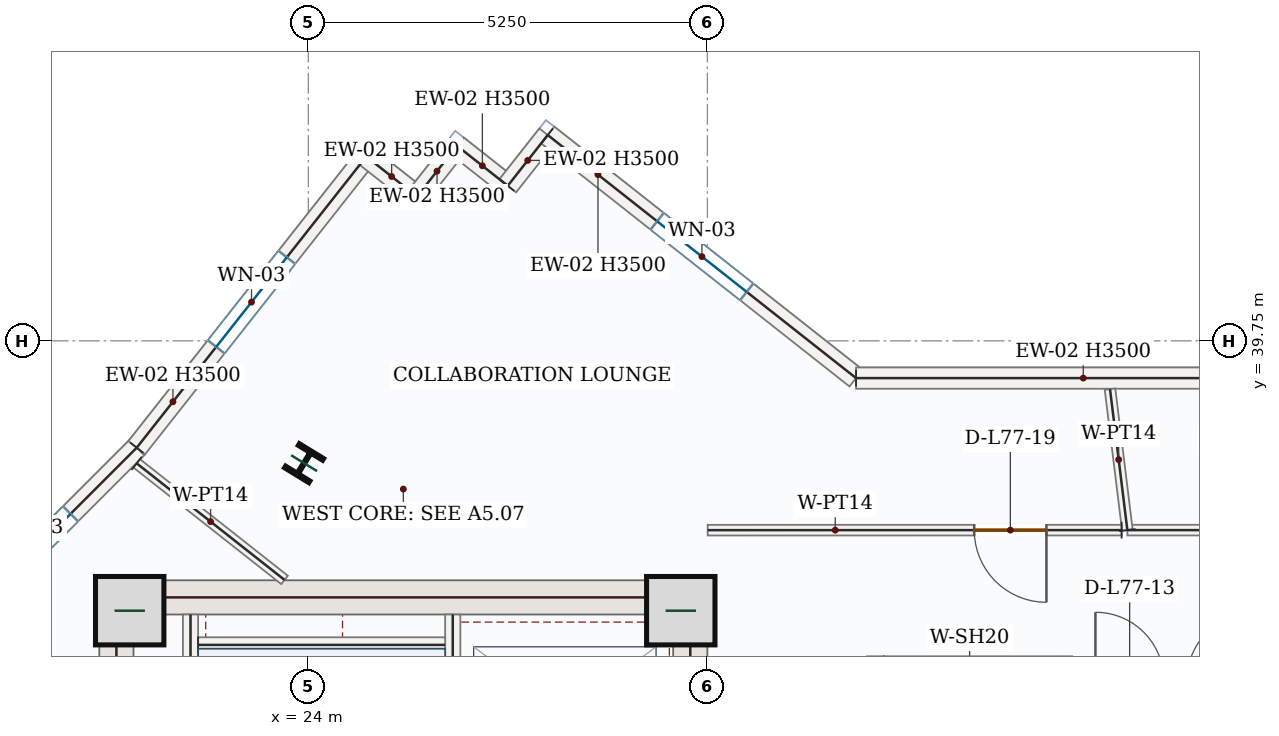
"""IFC4 building model, lengths in metres.
Left out: names, types, materials, properties, quantities, classifications, styles, units other than length and angle.
Written with IfcOpenShell. Run it as: python <this file> out.ifc"""

import sys

from ifc_helpers import new_model, si_unit, direction, frame, frame_2d, origin, origin_2d, place, context, subcontext, project, spatial, rectangle, i_section, extrude, source, transform, mapped, element, fill, save


model = new_model("IFC4")
c1 = context("Model", 3, precision=1e-05, world=origin(), true_north=direction((0.0, 1.0)))
c2 = subcontext(c1, "Body", "Model", "MODEL_VIEW")
j1 = project(units=[si_unit("LENGTHUNIT", "METRE"), si_unit("PLANEANGLEUNIT", "RADIAN")], contexts=[c1])
p1 = place(None, origin())
s1 = spatial("IfcSite", under=j1, at=p1, CompositionType="ELEMENT")
p2 = place(p1, origin())
s2 = spatial("IfcBuilding", under=s1, at=p2, CompositionType="ELEMENT")
p3 = place(p2, frame((0.0, 0.0, 319.8)))
s3 = spatial("IfcBuildingStorey", under=s2, at=p3, CompositionType="ELEMENT", Elevation=319.8)
m1 = source(origin(), c2, "Body", "SweptSolid", [
    extrude(rectangle(XDim=8.55, YDim=0.45, at=frame_2d((4.275, 0.0))), origin(), (0.0, 0.0, 1.0), 3.5),
])
p4 = place(p3, frame((21.475, 28.05, 0.0), z_axis=(0.0, 0.0, 1.0), x_axis=(0.0, 1.0, 0.0)))
e1 = element("IfcWall", 1, at=p4, inside=s3, PredefinedType="SHEAR", context=c2, shape_type="MappedRepresentation", body=[
    mapped(m1, transform((0.0, 0.0, 0.0), x_axis=(1.0, 0.0, 0.0), y_axis=(0.0, 1.0, 0.0), z_axis=(0.0, 0.0, 1.0), scale=1.0)),
])
p5 = place(p3, frame((29.025, 28.05, 0.0), z_axis=(0.0, 0.0, 1.0), x_axis=(0.0, 1.0, 0.0)))
e2 = element("IfcWall", 2, at=p5, inside=s3, PredefinedType="SHEAR", context=c2, shape_type="SweptSolid", body=[
    extrude(rectangle(XDim=8.55, YDim=0.45, at=frame_2d((4.275, 0.0))), origin(), (0.0, 0.0, 1.0), 3.5),
])
p6 = place(p5, frame((1.5, 0.0, 0.0)))
e3 = element("IfcOpeningElement", 3, at=p6, cuts=e2, PredefinedType="OPENING", context=c2, shape_type="SweptSolid", body=[
    extrude(rectangle(XDim=1.1, YDim=2.2, at=frame_2d((0.55, 1.1))), frame((0.0, 0.235, 0.0), z_axis=(0.0, -1.0, 0.0), x_axis=(1.0, 0.0, 0.0)), (0.0, 0.0, 1.0), 0.47),
])
m2 = source(origin(), c2, "Body", "SweptSolid", [
    extrude(rectangle(XDim=7.1, YDim=0.45, at=frame_2d((3.55, 0.0))), origin(), (0.0, 0.0, 1.0), 3.5),
])
p7 = place(p3, frame((21.7, 36.375, 0.0), z_axis=(0.0, 0.0, 1.0), x_axis=(1.0, 0.0, 0.0)))
e4 = element("IfcWall", 4, at=p7, inside=s3, PredefinedType="SHEAR", context=c2, shape_type="MappedRepresentation", body=[
    mapped(m2, transform((0.0, 0.0, 0.0), x_axis=(1.0, 0.0, 0.0), y_axis=(0.0, 1.0, 0.0), z_axis=(0.0, 0.0, 1.0), scale=1.0)),
])
m3 = source(origin(), c2, "Body", "SweptSolid", [
    extrude(rectangle(XDim=0.9, YDim=0.9, at=origin_2d()), origin(), (0.0, 0.0, 1.0), 3.75),
])
for number, where, z_axis, x_axis in (
    (5, (21.65, 36.2, 0.0), (0.0, 0.0, 1.0), (1.0, 0.0, 0.0)),
    (6, (28.9, 36.2, 0.0), (0.0, 0.0, 1.0), (1.0, 0.0, 0.0)),
):
    element("IfcColumn", number, at=place(p3, frame(where, z_axis=z_axis, x_axis=x_axis)), inside=s3, PredefinedType="COLUMN", context=c2, shape_type="MappedRepresentation", body=[
        mapped(m3, transform((0.0, 0.0, 0.0), x_axis=(1.0, 0.0, 0.0), y_axis=(0.0, 1.0, 0.0), z_axis=(0.0, 0.0, 1.0), scale=1.0)),
    ])
m4 = source(origin(), c2, "Body", "SweptSolid", [
    extrude(i_section(OverallWidth=0.374, OverallDepth=0.372, WebThickness=0.016, FlangeThickness=0.026, FilletRadius=0.018, at=origin_2d()), origin(), (0.0, 0.0, 1.0), 3.75),
])
p8 = place(p3, frame((23.945, 38.141, 0.0), z_axis=(0.0, 0.0, 1.0), x_axis=(-0.852640164354, 0.522498564716, 0.0)))
e7 = element("IfcColumn", 7, at=p8, inside=s3, PredefinedType="COLUMN", context=c2, shape_type="MappedRepresentation", body=[
    mapped(m4, transform((0.0, 0.0, 0.0), x_axis=(1.0, 0.0, 0.0), y_axis=(0.0, 1.0, 0.0), z_axis=(0.0, 0.0, 1.0), scale=1.0)),
])
p9 = place(p3, frame((18.94, 35.542, 0.0), z_axis=(0.0, 0.0, 1.0), x_axis=(0.707106781187, 0.707106781187, 0.0)))
e8 = element("IfcWall", 8, at=p9, inside=s3, PredefinedType="SOLIDWALL", context=c2, shape_type="SweptSolid", body=[
    extrude(rectangle(XDim=3.963, YDim=0.28, at=frame_2d((1.982, 0.0))), origin(), (0.0, 0.0, 1.0), 3.5),
])
p10 = place(p9, frame((1.232, 0.0, 0.85)))
e9 = element("IfcOpeningElement", 9, at=p10, cuts=e8, PredefinedType="OPENING", context=c2, shape_type="SweptSolid", body=[
    extrude(rectangle(XDim=1.5, YDim=1.5, at=frame_2d((0.75, 0.75))), frame((0.0, 0.15, 0.0), z_axis=(0.0, -1.0, 0.0), x_axis=(1.0, 0.0, 0.0)), (0.0, 0.0, 1.0), 0.3),
])
p11 = place(p3, frame((21.742, 38.344, 0.0), z_axis=(0.0, 0.0, 1.0), x_axis=(0.619093990715, 0.785316898239, 0.0)))
e10 = element("IfcWall", 10, at=p11, inside=s3, PredefinedType="SOLIDWALL", context=c2, shape_type="SweptSolid", body=[
    extrude(rectangle(XDim=4.878, YDim=0.28, at=frame_2d((2.439, 0.0))), origin(), (0.0, 0.0, 1.0), 3.5),
])
p12 = place(p11, frame((1.689, 0.0, 0.85)))
e11 = element("IfcOpeningElement", 11, at=p12, cuts=e10, PredefinedType="OPENING", context=c2, shape_type="SweptSolid", body=[
    extrude(rectangle(XDim=1.5, YDim=1.5, at=frame_2d((0.75, 0.75))), frame((0.0, 0.15, 0.0), z_axis=(0.0, -1.0, 0.0), x_axis=(1.0, 0.0, 0.0)), (0.0, 0.0, 1.0), 0.3),
])
m5 = source(origin(), c2, "Body", "SweptSolid", [
    extrude(rectangle(XDim=0.85, YDim=0.28, at=frame_2d((0.425, 0.0))), origin(), (0.0, 0.0, 1.0), 3.5),
])
p13 = place(p3, frame((24.762, 42.175, 0.0), z_axis=(0.0, 0.0, 1.0), x_axis=(0.785360476625, -0.619038707801, 0.0)))
e12 = element("IfcWall", 12, at=p13, inside=s3, PredefinedType="SOLIDWALL", context=c2, shape_type="MappedRepresentation", body=[
    mapped(m5, transform((0.0, 0.0, 0.0), x_axis=(1.0, 0.0, 0.0), y_axis=(0.0, 1.0, 0.0), z_axis=(0.0, 0.0, 1.0), scale=1.0)),
])
m6 = source(origin(), c2, "Body", "SweptSolid", [
    extrude(rectangle(XDim=0.85, YDim=0.28, at=frame_2d((0.425, 0.0))), origin(), (0.0, 0.0, 1.0), 3.5),
])
for number, where, z_axis, x_axis in (
    (13, (25.43, 41.649, 0.0), (0.0, 0.0, 1.0), (0.619, 0.785, 0.0)),
    (14, (25.956, 42.316, 0.0), (0.0, 0.0, 1.0), (0.785, -0.619, 0.0)),
):
    element("IfcWall", number, at=place(p3, frame(where, z_axis=z_axis, x_axis=x_axis)), inside=s3, PredefinedType="SOLIDWALL", context=c2, shape_type="MappedRepresentation", body=[
        mapped(m6, transform((0.0, 0.0, 0.0), x_axis=(1.0, 0.0, 0.0), y_axis=(0.0, 1.0, 0.0), z_axis=(0.0, 0.0, 1.0), scale=1.0)),
    ])
m7 = source(origin(), c2, "Body", "SweptSolid", [
    extrude(rectangle(XDim=0.85, YDim=0.28, at=frame_2d((0.425, 0.0))), origin(), (0.0, 0.0, 1.0), 3.5),
])
p14 = place(p3, frame((26.624, 41.79, 0.0), z_axis=(0.0, 0.0, 1.0), x_axis=(0.619076214196, 0.785330911793, 0.0)))
e15 = element("IfcWall", 15, at=p14, inside=s3, PredefinedType="SOLIDWALL", context=c2, shape_type="MappedRepresentation", body=[
    mapped(m7, transform((0.0, 0.0, 0.0), x_axis=(1.0, 0.0, 0.0), y_axis=(0.0, 1.0, 0.0), z_axis=(0.0, 0.0, 1.0), scale=1.0)),
])
p15 = place(p3, frame((27.15, 42.458, 0.0), z_axis=(0.0, 0.0, 1.0), x_axis=(0.78530363687, -0.61911081231, 0.0)))
e16 = element("IfcWall", 16, at=p15, inside=s3, PredefinedType="SOLIDWALL", context=c2, shape_type="SweptSolid", body=[
    extrude(rectangle(XDim=5.165, YDim=0.28, at=frame_2d((2.583, 0.0))), origin(), (0.0, 0.0, 1.0), 3.5),
])
p16 = place(p15, frame((1.833, 0.0, 0.85)))
e17 = element("IfcOpeningElement", 17, at=p16, cuts=e16, PredefinedType="OPENING", context=c2, shape_type="SweptSolid", body=[
    extrude(rectangle(XDim=1.5, YDim=1.5, at=frame_2d((0.75, 0.75))), frame((0.0, 0.15, 0.0), z_axis=(0.0, -1.0, 0.0), x_axis=(1.0, 0.0, 0.0)), (0.0, 0.0, 1.0), 0.3),
])
m8 = source(origin(), c2, "Body", "SweptSolid", [
    extrude(rectangle(XDim=5.978, YDim=0.28, at=frame_2d((2.989, 0.0))), origin(), (0.0, 0.0, 1.0), 3.5),
])
p17 = place(p3, frame((31.206, 39.26, 0.0), z_axis=(0.0, 0.0, 1.0), x_axis=(1.0, 0.0, 0.0)))
e18 = element("IfcWall", 18, at=p17, inside=s3, PredefinedType="SOLIDWALL", context=c2, shape_type="MappedRepresentation", body=[
    mapped(m8, transform((0.0, 0.0, 0.0), x_axis=(1.0, 0.0, 0.0), y_axis=(0.0, 1.0, 0.0), z_axis=(0.0, 0.0, 1.0), scale=1.0)),
])
m9 = source(origin(), c2, "Body", "SweptSolid", [
    extrude(rectangle(XDim=7.87, YDim=0.2, at=frame_2d((3.935, 0.0))), origin(), (0.0, 0.0, 1.0), 3.5),
])
p18 = place(p3, frame((22.45, 28.28, 0.0), z_axis=(0.0, 0.0, 1.0), x_axis=(0.0, 1.0, 0.0)))
e19 = element("IfcWall", 19, at=p18, inside=s3, PredefinedType="SOLIDWALL", context=c2, shape_type="MappedRepresentation", body=[
    mapped(m9, transform((0.0, 0.0, 0.0), x_axis=(1.0, 0.0, 0.0), y_axis=(0.0, 1.0, 0.0), z_axis=(0.0, 0.0, 1.0), scale=1.0)),
])
p19 = place(p3, frame((25.9, 28.15, 0.0), z_axis=(0.0, 0.0, 1.0), x_axis=(0.0, 1.0, 0.0)))
e20 = element("IfcWall", 20, at=p19, inside=s3, PredefinedType="SOLIDWALL", context=c2, shape_type="SweptSolid", body=[
    extrude(rectangle(XDim=8.0, YDim=0.2, at=frame_2d((4.0, 0.0))), origin(), (0.0, 0.0, 1.0), 3.5),
])
p20 = place(p19, frame((0.4, 0.0, 0.0)))
e21 = element("IfcOpeningElement", 21, at=p20, cuts=e20, PredefinedType="OPENING", context=c2, shape_type="SweptSolid", body=[
    extrude(rectangle(XDim=1.05, YDim=2.15, at=frame_2d((0.525, 1.075))), frame((0.0, 0.11, 0.0), z_axis=(0.0, -1.0, 0.0), x_axis=(1.0, 0.0, 0.0)), (0.0, 0.0, 1.0), 0.22),
])
m10 = source(origin(), c2, "Body", "SweptSolid", [
    extrude(rectangle(XDim=3.25, YDim=0.2, at=frame_2d((1.625, 0.0))), origin(), (0.0, 0.0, 1.0), 3.5),
])
p21 = place(p3, frame((22.55, 35.75, 0.0), z_axis=(0.0, 0.0, 1.0), x_axis=(1.0, 0.0, 0.0)))
e22 = element("IfcWall", 22, at=p21, inside=s3, PredefinedType="SOLIDWALL", context=c2, shape_type="MappedRepresentation", body=[
    mapped(m10, transform((0.0, 0.0, 0.0), x_axis=(1.0, 0.0, 0.0), y_axis=(0.0, 1.0, 0.0), z_axis=(0.0, 0.0, 1.0), scale=1.0)),
])
p22 = place(p3, frame((31.45, 33.2, 0.0), z_axis=(0.0, 0.0, 1.0), x_axis=(0.0, 1.0, 0.0)))
e23 = element("IfcWall", 23, at=p22, inside=s3, PredefinedType="SOLIDWALL", context=c2, shape_type="SweptSolid", body=[
    extrude(rectangle(XDim=2.4, YDim=0.2, at=frame_2d((1.2, 0.0))), origin(), (0.0, 0.0, 1.0), 3.5),
])
p23 = place(p22, frame((0.65, 0.0, 0.0)))
e24 = element("IfcOpeningElement", 24, at=p23, cuts=e23, PredefinedType="OPENING", context=c2, shape_type="SweptSolid", body=[
    extrude(rectangle(XDim=1.1, YDim=2.15, at=frame_2d((0.55, 1.075))), frame((0.0, 0.11, 0.0), z_axis=(0.0, -1.0, 0.0), x_axis=(1.0, 0.0, 0.0)), (0.0, 0.0, 1.0), 0.22),
])
m11 = source(origin(), c2, "Body", "SweptSolid", [
    extrude(rectangle(XDim=2.4, YDim=0.2, at=frame_2d((1.2, 0.0))), origin(), (0.0, 0.0, 1.0), 3.5),
])
p24 = place(p3, frame((33.95, 33.2, 0.0), z_axis=(0.0, 0.0, 1.0), x_axis=(0.0, 1.0, 0.0)))
e25 = element("IfcWall", 25, at=p24, inside=s3, PredefinedType="SOLIDWALL", context=c2, shape_type="MappedRepresentation", body=[
    mapped(m11, transform((0.0, 0.0, 0.0), x_axis=(1.0, 0.0, 0.0), y_axis=(0.0, 1.0, 0.0), z_axis=(0.0, 0.0, 1.0), scale=1.0)),
])
m12 = source(origin(), c2, "Body", "SweptSolid", [
    extrude(rectangle(XDim=2.477, YDim=0.14, at=frame_2d((1.239, 0.0))), origin(), (0.0, 0.0, 1.0), 3.5),
])
p25 = place(p3, frame((21.742, 38.138, 0.0), z_axis=(0.0, 0.0, 1.0), x_axis=(0.785339198937, -0.619065701371, 0.0)))
e26 = element("IfcWall", 26, at=p25, inside=s3, PredefinedType="PARTITIONING", context=c2, shape_type="MappedRepresentation", body=[
    mapped(m12, transform((0.0, 0.0, 0.0), x_axis=(1.0, 0.0, 0.0), y_axis=(0.0, 1.0, 0.0), z_axis=(0.0, 0.0, 1.0), scale=1.0)),
])
p26 = place(p3, frame((40.612, 37.26, 0.0), z_axis=(0.0, 0.0, 1.0), x_axis=(-1.0, 0.0, 0.0)))
e27 = element("IfcWall", 27, at=p26, inside=s3, PredefinedType="PARTITIONING", context=c2, shape_type="SweptSolid", body=[
    extrude(rectangle(XDim=5.837, YDim=0.14, at=frame_2d((2.918, 0.0))), origin(), (0.0, 0.0, 1.0), 3.5),
])
p27 = place(p26, frame((3.812, 0.0, 0.0)))
e28 = element("IfcOpeningElement", 28, at=p27, cuts=e27, PredefinedType="OPENING", context=c2, shape_type="SweptSolid", body=[
    extrude(rectangle(XDim=0.95, YDim=2.15, at=frame_2d((0.475, 1.075))), frame((0.0, 0.08, 0.0), z_axis=(0.0, -1.0, 0.0), x_axis=(1.0, 0.0, 0.0)), (0.0, 0.0, 1.0), 0.16),
])
m13 = source(origin(), c2, "Body", "SweptSolid", [
    extrude(rectangle(XDim=1.869, YDim=0.14, at=frame_2d((0.934, 0.0))), origin(), (0.0, 0.0, 1.0), 3.5),
])
p28 = place(p3, frame((34.775, 37.26, 0.0), z_axis=(0.0, 0.0, 1.0), x_axis=(-0.122153221409, 0.992511254596, 0.0)))
e29 = element("IfcWall", 29, at=p28, inside=s3, PredefinedType="PARTITIONING", context=c2, shape_type="MappedRepresentation", body=[
    mapped(m13, transform((0.0, 0.0, 0.0), x_axis=(1.0, 0.0, 0.0), y_axis=(0.0, 1.0, 0.0), z_axis=(0.0, 0.0, 1.0), scale=1.0)),
])
p29 = place(p3, frame((34.7, 37.26, 0.0), z_axis=(0.0, 0.0, 1.0), x_axis=(-0.999999995981, -8.9657955e-05, 0.0)))
e30 = element("IfcWall", 30, at=p29, inside=s3, PredefinedType="PARTITIONING", context=c2, shape_type="SweptSolid", body=[
    extrude(rectangle(XDim=5.446, YDim=0.14, at=frame_2d((2.723, 0.0))), origin(), (0.0, 0.0, 1.0), 3.5),
])
p30 = place(p29, frame((0.989, 0.0, 0.0)))
e31 = element("IfcOpeningElement", 31, at=p30, cuts=e30, PredefinedType="OPENING", context=c2, shape_type="SweptSolid", body=[
    extrude(rectangle(XDim=0.95, YDim=2.15, at=frame_2d((0.475, 1.075))), frame((0.0, 0.08, 0.0), z_axis=(0.0, -1.0, 0.0), x_axis=(1.0, 0.0, 0.0)), (0.0, 0.0, 1.0), 0.16),
])
m14 = source(origin(), c2, "Body", "SweptSolid", [
    extrude(rectangle(XDim=1.5, YDim=1.5, at=frame_2d((0.75, 0.75))), frame((0.0, 0.03, 0.0), z_axis=(0.0, -1.0, 0.0), x_axis=(1.0, 0.0, 0.0)), (0.0, 0.0, 1.0), 0.06),
])
p31 = place(p10, origin())
e32 = element("IfcWindow", 32, at=p31, inside=s3, PartitioningType="SINGLE_PANEL", PredefinedType="WINDOW", context=c2, shape_type="MappedRepresentation", body=[
    mapped(m14, transform((0.0, 0.0, 0.0), x_axis=(1.0, 0.0, 0.0), y_axis=(0.0, 1.0, 0.0), z_axis=(0.0, 0.0, 1.0), scale=1.0)),
])
fill(e9, e32)
p32 = place(p12, origin())
e33 = element("IfcWindow", 33, at=p32, inside=s3, PartitioningType="SINGLE_PANEL", PredefinedType="WINDOW", context=c2, shape_type="MappedRepresentation", body=[
    mapped(m14, transform((0.0, 0.0, 0.0), x_axis=(1.0, 0.0, 0.0), y_axis=(0.0, 1.0, 0.0), z_axis=(0.0, 0.0, 1.0), scale=1.0)),
])
fill(e11, e33)
p33 = place(p16, origin())
e34 = element("IfcWindow", 34, at=p33, inside=s3, PartitioningType="SINGLE_PANEL", PredefinedType="WINDOW", context=c2, shape_type="MappedRepresentation", body=[
    mapped(m14, transform((0.0, 0.0, 0.0), x_axis=(1.0, 0.0, 0.0), y_axis=(0.0, 1.0, 0.0), z_axis=(0.0, 0.0, 1.0), scale=1.0)),
])
fill(e17, e34)
m15 = source(origin(), c2, "Body", "SweptSolid", [
    extrude(rectangle(XDim=0.95, YDim=2.15, at=frame_2d((0.475, 1.075))), frame((0.0, 0.025, 0.0), z_axis=(0.0, -1.0, 0.0), x_axis=(1.0, 0.0, 0.0)), (0.0, 0.0, 1.0), 0.05),
])
p34 = place(p30, origin())
e35 = element("IfcDoor", 35, at=p34, inside=s3, OperationType="SINGLE_SWING_LEFT", PredefinedType="DOOR", context=c2, shape_type="MappedRepresentation", body=[
    mapped(m15, transform((0.0, 0.0, 0.0), x_axis=(1.0, 0.0, 0.0), y_axis=(0.0, 1.0, 0.0), z_axis=(0.0, 0.0, 1.0), scale=1.0)),
])
fill(e31, e35)
save(model, sys.argv[1])
